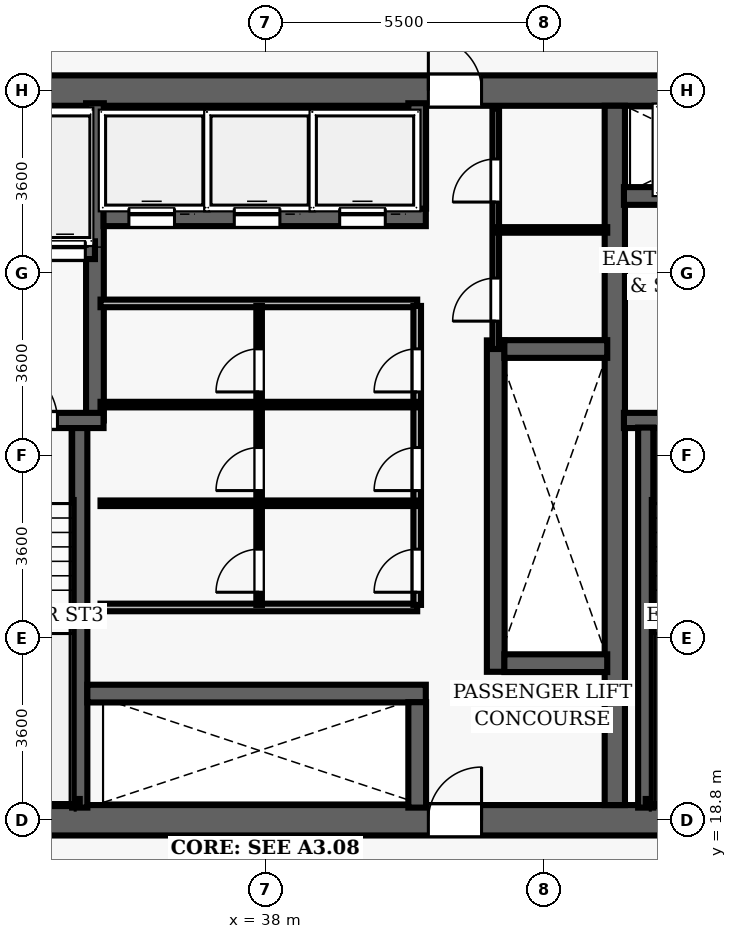
"""IFC4 building model, lengths in metres.
Left out: names, types, materials, properties, quantities, classifications, styles, units other than length and angle.
Written with IfcOpenShell. Run it as: python <this file> out.ifc"""

import sys

from ifc_helpers import new_model, si_unit, direction, frame, frame_2d, origin, place, context, subcontext, project, spatial, rectangle, extrude, element, fill, save


model = new_model("IFC4")
c1 = context("Model", 3, precision=1e-05, world=origin(), true_north=direction((0.0, 1.0)))
c2 = subcontext(c1, "Body", "Model", "MODEL_VIEW")
j1 = project(units=[si_unit("LENGTHUNIT", "METRE"), si_unit("PLANEANGLEUNIT", "RADIAN")], contexts=[c1])
p1 = place(None, origin())
s1 = spatial("IfcSite", under=j1, at=p1, CompositionType="ELEMENT")
p2 = place(p1, origin())
s2 = spatial("IfcBuilding", under=s1, at=p2, CompositionType="ELEMENT")
p3 = place(p2, frame((0.0, 0.0, 48.4)))
s3 = spatial("IfcBuildingStorey", under=s2, at=p3, CompositionType="ELEMENT", Elevation=48.4)
p4 = place(p3, frame((26.7, 18.8, 0.0), z_axis=(0.0, 0.0, 1.0), x_axis=(1.0, 0.0, 0.0)))
e1 = element("IfcWall", 1, at=p4, inside=s3, PredefinedType="SHEAR", context=c2, shape_type="SweptSolid", body=[
    extrude(rectangle(XDim=22.6, YDim=0.6, at=frame_2d((11.3, 0.0))), origin(), (0.0, 0.0, 1.0), 3.5),
])
p5 = place(p4, frame((14.52, 0.0, 0.0)))
e2 = element("IfcOpeningElement", 2, at=p5, cuts=e1, PredefinedType="OPENING", context=c2, shape_type="SweptSolid", body=[
    extrude(rectangle(XDim=1.05, YDim=2.15, at=frame_2d((0.525, 1.075))), frame((0.0, 0.31, 0.0), z_axis=(0.0, -1.0, 0.0), x_axis=(1.0, 0.0, 0.0)), (0.0, 0.0, 1.0), 0.62),
])
p6 = place(p3, frame((26.7, 33.2, 0.0), z_axis=(0.0, 0.0, 1.0), x_axis=(1.0, 0.0, 0.0)))
e3 = element("IfcWall", 3, at=p6, inside=s3, PredefinedType="SHEAR", context=c2, shape_type="SweptSolid", body=[
    extrude(rectangle(XDim=22.6, YDim=0.6, at=frame_2d((11.3, 0.0))), origin(), (0.0, 0.0, 1.0), 3.5),
])
p7 = place(p6, frame((4.62, 0.0, 0.0)))
e4 = element("IfcOpeningElement", 4, at=p7, cuts=e3, PredefinedType="OPENING", context=c2, shape_type="SweptSolid", body=[
    extrude(rectangle(XDim=1.05, YDim=2.15, at=frame_2d((0.525, 1.075))), frame((0.0, 0.31, 0.0), z_axis=(0.0, -1.0, 0.0), x_axis=(1.0, 0.0, 0.0)), (0.0, 0.0, 1.0), 0.62),
])
p8 = place(p6, frame((14.52, 0.0, 0.0)))
e5 = element("IfcOpeningElement", 5, at=p8, cuts=e3, PredefinedType="OPENING", context=c2, shape_type="SweptSolid", body=[
    extrude(rectangle(XDim=1.05, YDim=2.15, at=frame_2d((0.525, 1.075))), frame((0.0, 0.31, 0.0), z_axis=(0.0, -1.0, 0.0), x_axis=(1.0, 0.0, 0.0)), (0.0, 0.0, 1.0), 0.62),
])
p9 = place(p3, frame((44.9, 19.1, 0.0), z_axis=(0.0, 0.0, 1.0), x_axis=(0.0, 1.0, 0.0)))
e6 = element("IfcWall", 6, at=p9, inside=s3, PredefinedType="SHEAR", context=c2, shape_type="SweptSolid", body=[
    extrude(rectangle(XDim=13.8, YDim=0.4, at=frame_2d((6.9, 0.0))), origin(), (0.0, 0.0, 1.0), 3.5),
])
p10 = place(p3, frame((45.08, 26.69, 0.0), z_axis=(0.0, 0.0, 1.0), x_axis=(1.0, 0.0, 0.0)))
e7 = element("IfcWall", 7, at=p10, inside=s3, PredefinedType="SHEAR", context=c2, shape_type="SweptSolid", body=[
    extrude(rectangle(XDim=3.67, YDim=0.3, at=frame_2d((1.835, 0.0))), origin(), (0.0, 0.0, 1.0), 3.5),
])
p11 = place(p10, frame((1.05, 0.0, 0.0)))
e8 = element("IfcOpeningElement", 8, at=p11, cuts=e7, PredefinedType="OPENING", context=c2, shape_type="SweptSolid", body=[
    extrude(rectangle(XDim=1.1, YDim=2.15, at=frame_2d((0.55, 1.075))), frame((0.0, 0.16, 0.0), z_axis=(0.0, -1.0, 0.0), x_axis=(1.0, 0.0, 0.0)), (0.0, 0.0, 1.0), 0.32),
])
p12 = place(p3, frame((45.51, 19.05, 0.0), z_axis=(0.0, 0.0, 1.0), x_axis=(0.0, 1.0, 0.0)))
e9 = element("IfcWall", 9, at=p12, inside=s3, PredefinedType="SHEAR", context=c2, shape_type="SweptSolid", body=[
    extrude(rectangle(XDim=7.5, YDim=0.3, at=frame_2d((3.75, 0.0))), origin(), (0.0, 0.0, 1.0), 3.5),
])
p13 = place(p3, frame((45.51, 19.16, 0.0), z_axis=(0.0, 0.0, 1.0), x_axis=(1.0, 0.0, 0.0)))
e10 = element("IfcWall", 10, at=p13, inside=s3, PredefinedType="SHEAR", context=c2, shape_type="SweptSolid", body=[
    extrude(rectangle(XDim=3.095, YDim=0.12, at=frame_2d((1.547, 0.0))), origin(), (0.0, 0.0, 1.0), 3.5),
])
p14 = place(p3, frame((45.08, 31.12, 0.0), z_axis=(0.0, 0.0, 1.0), x_axis=(1.0, 0.0, 0.0)))
e11 = element("IfcWall", 11, at=p14, inside=s3, PredefinedType="SHEAR", context=c2, shape_type="SweptSolid", body=[
    extrude(rectangle(XDim=3.67, YDim=0.35, at=frame_2d((1.835, 0.0))), origin(), (0.0, 0.0, 1.0), 2.6),
])
p15 = place(p14, frame((1.25, 0.0, 0.0)))
e12 = element("IfcOpeningElement", 12, at=p15, cuts=e11, PredefinedType="OPENING", context=c2, shape_type="SweptSolid", body=[
    extrude(rectangle(XDim=1.1, YDim=2.15, at=frame_2d((0.55, 1.075))), frame((0.0, 0.185, 0.0), z_axis=(0.0, -1.0, 0.0), x_axis=(1.0, 0.0, 0.0)), (0.0, 0.0, 1.0), 0.37),
])
p16 = place(p3, frame((34.34, 19.05, 0.0), z_axis=(0.0, 0.0, 1.0), x_axis=(0.0, 1.0, 0.0)))
e13 = element("IfcWall", 13, at=p16, inside=s3, PredefinedType="SHEAR", context=c2, shape_type="SweptSolid", body=[
    extrude(rectangle(XDim=7.5, YDim=0.3, at=frame_2d((3.75, 0.0))), origin(), (0.0, 0.0, 1.0), 3.5),
])
p17 = place(p3, frame((34.64, 26.69, 0.0), z_axis=(0.0, 0.0, 1.0), x_axis=(0.0, 1.0, 0.0)))
e14 = element("IfcWall", 14, at=p17, inside=s3, PredefinedType="SHEAR", context=c2, shape_type="SweptSolid", body=[
    extrude(rectangle(XDim=6.26, YDim=0.35, at=frame_2d((3.13, 0.0))), origin(), (0.0, 0.0, 1.0), 3.5),
])
p18 = place(p3, frame((31.25, 26.69, 0.0), z_axis=(0.0, 0.0, 1.0), x_axis=(1.0, 0.0, 0.0)))
e15 = element("IfcWall", 15, at=p18, inside=s3, PredefinedType="SHEAR", context=c2, shape_type="SweptSolid", body=[
    extrude(rectangle(XDim=3.56, YDim=0.3, at=frame_2d((1.78, 0.0))), origin(), (0.0, 0.0, 1.0), 3.5),
])
p19 = place(p18, frame((1.55, 0.0, 0.0)))
e16 = element("IfcOpeningElement", 16, at=p19, cuts=e15, PredefinedType="OPENING", context=c2, shape_type="SweptSolid", body=[
    extrude(rectangle(XDim=1.1, YDim=2.15, at=frame_2d((0.55, 1.075))), frame((0.0, 0.16, 0.0), z_axis=(0.0, -1.0, 0.0), x_axis=(1.0, 0.0, 0.0)), (0.0, 0.0, 1.0), 0.32),
])
p20 = place(p3, frame((31.3, 19.16, 0.0), z_axis=(0.0, 0.0, 1.0), x_axis=(1.0, 0.0, 0.0)))
e17 = element("IfcWall", 17, at=p20, inside=s3, PredefinedType="SHEAR", context=c2, shape_type="SweptSolid", body=[
    extrude(rectangle(XDim=3.04, YDim=0.12, at=frame_2d((1.52, 0.0))), origin(), (0.0, 0.0, 1.0), 3.5),
])
p21 = place(p3, frame((32.23, 30.05, 0.0), z_axis=(0.0, 0.0, 1.0), x_axis=(1.0, 0.0, 0.0)))
e18 = element("IfcWall", 18, at=p21, inside=s3, PredefinedType="SHEAR", context=c2, shape_type="SweptSolid", body=[
    extrude(rectangle(XDim=2.41, YDim=0.35, at=frame_2d((1.205, 0.0))), origin(), (0.0, 0.0, 1.0), 2.6),
])
p22 = place(p21, frame((0.42, 0.0, 0.0)))
e19 = element("IfcOpeningElement", 19, at=p22, cuts=e18, PredefinedType="OPENING", context=c2, shape_type="SweptSolid", body=[
    extrude(rectangle(XDim=0.8, YDim=2.15, at=frame_2d((0.4, 1.075))), frame((0.0, 0.185, 0.0), z_axis=(0.0, -1.0, 0.0), x_axis=(1.0, 0.0, 0.0)), (0.0, 0.0, 1.0), 0.37),
])
p23 = place(p21, frame((1.42, 0.0, 0.0)))
e20 = element("IfcOpeningElement", 20, at=p23, cuts=e18, PredefinedType="OPENING", context=c2, shape_type="SweptSolid", body=[
    extrude(rectangle(XDim=0.8, YDim=2.15, at=frame_2d((0.4, 1.075))), frame((0.0, 0.185, 0.0), z_axis=(0.0, -1.0, 0.0), x_axis=(1.0, 0.0, 0.0)), (0.0, 0.0, 1.0), 0.37),
])
p24 = place(p3, frame((42.55, 21.73, 0.0), z_axis=(0.0, 0.0, 1.0), x_axis=(0.0, 1.0, 0.0)))
e21 = element("IfcWall", 21, at=p24, inside=s3, PredefinedType="SHEAR", context=c2, shape_type="SweptSolid", body=[
    extrude(rectangle(XDim=6.54, YDim=0.35, at=frame_2d((3.27, 0.0))), origin(), (0.0, 0.0, 1.0), 2.6),
])
for number, where, z_axis, x_axis in (
    (22, (42.72, 21.9, 0.0), (0.0, 0.0, 1.0), (1.0, 0.0, 0.0)),
    (23, (42.72, 28.1, 0.0), (0.0, 0.0, 1.0), (1.0, 0.0, 0.0)),
):
    element("IfcWall", number, at=place(p3, frame(where, z_axis=z_axis, x_axis=x_axis)), inside=s3, PredefinedType="SHEAR", context=c2, shape_type="SweptSolid", body=[
        extrude(rectangle(XDim=2.03, YDim=0.35, at=frame_2d((1.015, 0.0))), origin(), (0.0, 0.0, 1.0), 2.6),
    ])
p25 = place(p3, frame((34.81, 30.7, 0.0), z_axis=(0.0, 0.0, 1.0), x_axis=(1.0, 0.0, 0.0)))
e24 = element("IfcWall", 24, at=p25, inside=s3, PredefinedType="SHEAR", context=c2, shape_type="SweptSolid", body=[
    extrude(rectangle(XDim=6.36, YDim=0.35, at=frame_2d((3.18, 0.0))), origin(), (0.0, 0.0, 1.0), 2.6),
])
p26 = place(p25, frame((0.5, 0.0, 0.0)))
e25 = element("IfcOpeningElement", 25, at=p26, cuts=e24, PredefinedType="OPENING", context=c2, shape_type="SweptSolid", body=[
    extrude(rectangle(XDim=0.9, YDim=2.15, at=frame_2d((0.45, 1.075))), frame((0.0, 0.185, 0.0), z_axis=(0.0, -1.0, 0.0), x_axis=(1.0, 0.0, 0.0)), (0.0, 0.0, 1.0), 0.37),
])
p27 = place(p25, frame((2.58, 0.0, 0.0)))
e26 = element("IfcOpeningElement", 26, at=p27, cuts=e24, PredefinedType="OPENING", context=c2, shape_type="SweptSolid", body=[
    extrude(rectangle(XDim=0.9, YDim=2.15, at=frame_2d((0.45, 1.075))), frame((0.0, 0.185, 0.0), z_axis=(0.0, -1.0, 0.0), x_axis=(1.0, 0.0, 0.0)), (0.0, 0.0, 1.0), 0.37),
])
p28 = place(p25, frame((4.66, 0.0, 0.0)))
e27 = element("IfcOpeningElement", 27, at=p28, cuts=e24, PredefinedType="OPENING", context=c2, shape_type="SweptSolid", body=[
    extrude(rectangle(XDim=0.9, YDim=2.15, at=frame_2d((0.45, 1.075))), frame((0.0, 0.185, 0.0), z_axis=(0.0, -1.0, 0.0), x_axis=(1.0, 0.0, 0.0)), (0.0, 0.0, 1.0), 0.37),
])
p29 = place(p3, frame((41.0, 30.87, 0.0), z_axis=(0.0, 0.0, 1.0), x_axis=(0.0, 1.0, 0.0)))
e28 = element("IfcWall", 28, at=p29, inside=s3, PredefinedType="SHEAR", context=c2, shape_type="SweptSolid", body=[
    extrude(rectangle(XDim=2.08, YDim=0.35, at=frame_2d((1.04, 0.0))), origin(), (0.0, 0.0, 1.0), 2.6),
])
p30 = place(p3, frame((34.49, 21.3, 0.0), z_axis=(0.0, 0.0, 1.0), x_axis=(1.0, 0.0, 0.0)))
e29 = element("IfcWall", 29, at=p30, inside=s3, PredefinedType="SHEAR", context=c2, shape_type="SweptSolid", body=[
    extrude(rectangle(XDim=6.68, YDim=0.35, at=frame_2d((3.34, 0.0))), origin(), (0.0, 0.0, 1.0), 2.6),
])
p31 = place(p3, frame((41.0, 19.05, 0.0), z_axis=(0.0, 0.0, 1.0), x_axis=(0.0, 1.0, 0.0)))
e30 = element("IfcWall", 30, at=p31, inside=s3, PredefinedType="SHEAR", context=c2, shape_type="SweptSolid", body=[
    extrude(rectangle(XDim=2.08, YDim=0.35, at=frame_2d((1.04, 0.0))), origin(), (0.0, 0.0, 1.0), 2.6),
])
for number, where, z_axis, x_axis in (
    (31, (34.75, 29.0, 0.0), (0.0, 0.0, 1.0), (1.0, 0.0, 0.0)),
    (32, (34.75, 23.0, 0.0), (0.0, 0.0, 1.0), (1.0, 0.0, 0.0)),
):
    element("IfcWall", number, at=place(p3, frame(where, z_axis=z_axis, x_axis=x_axis)), inside=s3, PredefinedType="PARTITIONING", context=c2, shape_type="SweptSolid", body=[
        extrude(rectangle(XDim=6.25, YDim=0.15, at=frame_2d((3.125, 0.0))), origin(), (0.0, 0.0, 1.0), 2.6),
    ])
p32 = place(p3, frame((41.0, 23.05, 0.0), z_axis=(0.0, 0.0, 1.0), x_axis=(0.0, 1.0, 0.0)))
e33 = element("IfcWall", 33, at=p32, inside=s3, PredefinedType="PARTITIONING", context=c2, shape_type="SweptSolid", body=[
    extrude(rectangle(XDim=5.9, YDim=0.15, at=frame_2d((2.95, 0.0))), origin(), (0.0, 0.0, 1.0), 2.6),
])
p33 = place(p32, frame((0.25, 0.0, 0.0)))
e34 = element("IfcOpeningElement", 34, at=p33, cuts=e33, PredefinedType="OPENING", context=c2, shape_type="SweptSolid", body=[
    extrude(rectangle(XDim=0.85, YDim=2.1, at=frame_2d((0.425, 1.05))), frame((0.0, 0.085, 0.0), z_axis=(0.0, -1.0, 0.0), x_axis=(1.0, 0.0, 0.0)), (0.0, 0.0, 1.0), 0.17),
])
p34 = place(p32, frame((2.256, 0.0, 0.0)))
e35 = element("IfcOpeningElement", 35, at=p34, cuts=e33, PredefinedType="OPENING", context=c2, shape_type="SweptSolid", body=[
    extrude(rectangle(XDim=0.85, YDim=2.1, at=frame_2d((0.425, 1.05))), frame((0.0, 0.085, 0.0), z_axis=(0.0, -1.0, 0.0), x_axis=(1.0, 0.0, 0.0)), (0.0, 0.0, 1.0), 0.17),
])
p35 = place(p32, frame((4.203, 0.0, 0.0)))
e36 = element("IfcOpeningElement", 36, at=p35, cuts=e33, PredefinedType="OPENING", context=c2, shape_type="SweptSolid", body=[
    extrude(rectangle(XDim=0.85, YDim=2.1, at=frame_2d((0.425, 1.05))), frame((0.0, 0.085, 0.0), z_axis=(0.0, -1.0, 0.0), x_axis=(1.0, 0.0, 0.0)), (0.0, 0.0, 1.0), 0.17),
])
p36 = place(p3, frame((37.88, 23.05, 0.0), z_axis=(0.0, 0.0, 1.0), x_axis=(0.0, 1.0, 0.0)))
e37 = element("IfcWall", 37, at=p36, inside=s3, PredefinedType="PARTITIONING", context=c2, shape_type="SweptSolid", body=[
    extrude(rectangle(XDim=5.9, YDim=0.11, at=frame_2d((2.95, 0.0))), origin(), (0.0, 0.0, 1.0), 2.6),
])
p37 = place(p36, frame((0.25, 0.0, 0.0)))
e38 = element("IfcOpeningElement", 38, at=p37, cuts=e37, PredefinedType="OPENING", context=c2, shape_type="SweptSolid", body=[
    extrude(rectangle(XDim=0.85, YDim=2.1, at=frame_2d((0.425, 1.05))), frame((0.0, 0.065, 0.0), z_axis=(0.0, -1.0, 0.0), x_axis=(1.0, 0.0, 0.0)), (0.0, 0.0, 1.0), 0.13),
])
p38 = place(p36, frame((2.256, 0.0, 0.0)))
e39 = element("IfcOpeningElement", 39, at=p38, cuts=e37, PredefinedType="OPENING", context=c2, shape_type="SweptSolid", body=[
    extrude(rectangle(XDim=0.85, YDim=2.1, at=frame_2d((0.425, 1.05))), frame((0.0, 0.065, 0.0), z_axis=(0.0, -1.0, 0.0), x_axis=(1.0, 0.0, 0.0)), (0.0, 0.0, 1.0), 0.13),
])
p39 = place(p36, frame((4.203, 0.0, 0.0)))
e40 = element("IfcOpeningElement", 40, at=p39, cuts=e37, PredefinedType="OPENING", context=c2, shape_type="SweptSolid", body=[
    extrude(rectangle(XDim=0.85, YDim=2.1, at=frame_2d((0.425, 1.05))), frame((0.0, 0.065, 0.0), z_axis=(0.0, -1.0, 0.0), x_axis=(1.0, 0.0, 0.0)), (0.0, 0.0, 1.0), 0.13),
])
for number, where, z_axis, x_axis in (
    (41, (34.75, 25.056, 0.0), (0.0, 0.0, 1.0), (1.0, 0.0, 0.0)),
    (42, (34.75, 27.003, 0.0), (0.0, 0.0, 1.0), (1.0, 0.0, 0.0)),
):
    element("IfcWall", number, at=place(p3, frame(where, z_axis=z_axis, x_axis=x_axis)), inside=s3, PredefinedType="PARTITIONING", context=c2, shape_type="SweptSolid", body=[
        extrude(rectangle(XDim=6.25, YDim=0.11, at=frame_2d((3.125, 0.0))), origin(), (0.0, 0.0, 1.0), 2.6),
    ])
p40 = place(p3, frame((42.55, 28.1, 0.0), z_axis=(0.0, 0.0, 1.0), x_axis=(0.0, 1.0, 0.0)))
e43 = element("IfcWall", 43, at=p40, inside=s3, PredefinedType="PARTITIONING", context=c2, shape_type="SweptSolid", body=[
    extrude(rectangle(XDim=4.75, YDim=0.13, at=frame_2d((2.375, 0.0))), origin(), (0.0, 0.0, 1.0), 2.6),
])
p41 = place(p40, frame((0.55, 0.0, 0.0)))
e44 = element("IfcOpeningElement", 44, at=p41, cuts=e43, PredefinedType="OPENING", context=c2, shape_type="SweptSolid", body=[
    extrude(rectangle(XDim=0.85, YDim=2.1, at=frame_2d((0.425, 1.05))), frame((0.0, 0.075, 0.0), z_axis=(0.0, -1.0, 0.0), x_axis=(1.0, 0.0, 0.0)), (0.0, 0.0, 1.0), 0.15),
])
p42 = place(p40, frame((2.9, 0.0, 0.0)))
e45 = element("IfcOpeningElement", 45, at=p42, cuts=e43, PredefinedType="OPENING", context=c2, shape_type="SweptSolid", body=[
    extrude(rectangle(XDim=0.85, YDim=2.1, at=frame_2d((0.425, 1.05))), frame((0.0, 0.075, 0.0), z_axis=(0.0, -1.0, 0.0), x_axis=(1.0, 0.0, 0.0)), (0.0, 0.0, 1.0), 0.15),
])
p43 = place(p3, frame((42.55, 30.45, 0.0), z_axis=(0.0, 0.0, 1.0), x_axis=(1.0, 0.0, 0.0)))
e46 = element("IfcWall", 46, at=p43, inside=s3, PredefinedType="PARTITIONING", context=c2, shape_type="SweptSolid", body=[
    extrude(rectangle(XDim=2.2, YDim=0.11, at=frame_2d((1.1, 0.0))), origin(), (0.0, 0.0, 1.0), 2.6),
])
p44 = place(p19, origin())
e47 = element("IfcDoor", 47, at=p44, inside=s3, OperationType="SINGLE_SWING_LEFT", PredefinedType="DOOR", context=c2, shape_type="SweptSolid", body=[
    extrude(rectangle(XDim=1.1, YDim=2.15, at=frame_2d((0.55, 1.075))), frame((0.0, 0.025, 0.0), z_axis=(0.0, -1.0, 0.0), x_axis=(1.0, 0.0, 0.0)), (0.0, 0.0, 1.0), 0.05),
])
fill(e16, e47)
p45 = place(p8, origin())
e48 = element("IfcDoor", 48, at=p45, inside=s3, OperationType="SINGLE_SWING_LEFT", PredefinedType="DOOR", context=c2, shape_type="SweptSolid", body=[
    extrude(rectangle(XDim=1.05, YDim=2.15, at=frame_2d((0.525, 1.075))), frame((0.0, 0.025, 0.0), z_axis=(0.0, -1.0, 0.0), x_axis=(1.0, 0.0, 0.0)), (0.0, 0.0, 1.0), 0.05),
])
fill(e5, e48)
p46 = place(p5, origin())
e49 = element("IfcDoor", 49, at=p46, inside=s3, OperationType="SINGLE_SWING_RIGHT", PredefinedType="DOOR", context=c2, shape_type="SweptSolid", body=[
    extrude(rectangle(XDim=1.05, YDim=2.15, at=frame_2d((0.525, 1.075))), frame((0.0, 0.025, 0.0), z_axis=(0.0, -1.0, 0.0), x_axis=(1.0, 0.0, 0.0)), (0.0, 0.0, 1.0), 0.05),
])
fill(e2, e49)
p47 = place(p33, origin())
e50 = element("IfcDoor", 50, at=p47, inside=s3, OperationType="SINGLE_SWING_LEFT", PredefinedType="DOOR", context=c2, shape_type="SweptSolid", body=[
    extrude(rectangle(XDim=0.85, YDim=2.1, at=frame_2d((0.425, 1.05))), frame((0.0, 0.025, 0.0), z_axis=(0.0, -1.0, 0.0), x_axis=(1.0, 0.0, 0.0)), (0.0, 0.0, 1.0), 0.05),
])
fill(e34, e50)
p48 = place(p37, origin())
e51 = element("IfcDoor", 51, at=p48, inside=s3, OperationType="SINGLE_SWING_LEFT", PredefinedType="DOOR", context=c2, shape_type="SweptSolid", body=[
    extrude(rectangle(XDim=0.85, YDim=2.1, at=frame_2d((0.425, 1.05))), frame((0.0, 0.025, 0.0), z_axis=(0.0, -1.0, 0.0), x_axis=(1.0, 0.0, 0.0)), (0.0, 0.0, 1.0), 0.05),
])
fill(e38, e51)
p49 = place(p34, origin())
e52 = element("IfcDoor", 52, at=p49, inside=s3, OperationType="SINGLE_SWING_LEFT", PredefinedType="DOOR", context=c2, shape_type="SweptSolid", body=[
    extrude(rectangle(XDim=0.85, YDim=2.1, at=frame_2d((0.425, 1.05))), frame((0.0, 0.025, 0.0), z_axis=(0.0, -1.0, 0.0), x_axis=(1.0, 0.0, 0.0)), (0.0, 0.0, 1.0), 0.05),
])
fill(e35, e52)
p50 = place(p38, origin())
e53 = element("IfcDoor", 53, at=p50, inside=s3, OperationType="SINGLE_SWING_LEFT", PredefinedType="DOOR", context=c2, shape_type="SweptSolid", body=[
    extrude(rectangle(XDim=0.85, YDim=2.1, at=frame_2d((0.425, 1.05))), frame((0.0, 0.025, 0.0), z_axis=(0.0, -1.0, 0.0), x_axis=(1.0, 0.0, 0.0)), (0.0, 0.0, 1.0), 0.05),
])
fill(e39, e53)
p51 = place(p35, origin())
e54 = element("IfcDoor", 54, at=p51, inside=s3, OperationType="SINGLE_SWING_LEFT", PredefinedType="DOOR", context=c2, shape_type="SweptSolid", body=[
    extrude(rectangle(XDim=0.85, YDim=2.1, at=frame_2d((0.425, 1.05))), frame((0.0, 0.025, 0.0), z_axis=(0.0, -1.0, 0.0), x_axis=(1.0, 0.0, 0.0)), (0.0, 0.0, 1.0), 0.05),
])
fill(e36, e54)
p52 = place(p39, origin())
e55 = element("IfcDoor", 55, at=p52, inside=s3, OperationType="SINGLE_SWING_LEFT", PredefinedType="DOOR", context=c2, shape_type="SweptSolid", body=[
    extrude(rectangle(XDim=0.85, YDim=2.1, at=frame_2d((0.425, 1.05))), frame((0.0, 0.025, 0.0), z_axis=(0.0, -1.0, 0.0), x_axis=(1.0, 0.0, 0.0)), (0.0, 0.0, 1.0), 0.05),
])
fill(e40, e55)
p53 = place(p41, origin())
e56 = element("IfcDoor", 56, at=p53, inside=s3, OperationType="SINGLE_SWING_LEFT", PredefinedType="DOOR", context=c2, shape_type="SweptSolid", body=[
    extrude(rectangle(XDim=0.85, YDim=2.1, at=frame_2d((0.425, 1.05))), frame((0.0, 0.025, 0.0), z_axis=(0.0, -1.0, 0.0), x_axis=(1.0, 0.0, 0.0)), (0.0, 0.0, 1.0), 0.05),
])
fill(e44, e56)
p54 = place(p42, origin())
e57 = element("IfcDoor", 57, at=p54, inside=s3, OperationType="SINGLE_SWING_LEFT", PredefinedType="DOOR", context=c2, shape_type="SweptSolid", body=[
    extrude(rectangle(XDim=0.85, YDim=2.1, at=frame_2d((0.425, 1.05))), frame((0.0, 0.025, 0.0), z_axis=(0.0, -1.0, 0.0), x_axis=(1.0, 0.0, 0.0)), (0.0, 0.0, 1.0), 0.05),
])
fill(e45, e57)
p55 = place(p26, origin())
e58 = element("IfcDoor", 58, at=p55, inside=s3, OperationType="SLIDING_TO_LEFT", PredefinedType="DOOR", context=c2, shape_type="SweptSolid", body=[
    extrude(rectangle(XDim=0.9, YDim=2.15, at=frame_2d((0.45, 1.075))), frame((0.0, 0.025, 0.0), z_axis=(0.0, -1.0, 0.0), x_axis=(1.0, 0.0, 0.0)), (0.0, 0.0, 1.0), 0.05),
])
fill(e25, e58)
p56 = place(p27, origin())
e59 = element("IfcDoor", 59, at=p56, inside=s3, OperationType="SLIDING_TO_LEFT", PredefinedType="DOOR", context=c2, shape_type="SweptSolid", body=[
    extrude(rectangle(XDim=0.9, YDim=2.15, at=frame_2d((0.45, 1.075))), frame((0.0, 0.025, 0.0), z_axis=(0.0, -1.0, 0.0), x_axis=(1.0, 0.0, 0.0)), (0.0, 0.0, 1.0), 0.05),
])
fill(e26, e59)
p57 = place(p28, origin())
e60 = element("IfcDoor", 60, at=p57, inside=s3, OperationType="SLIDING_TO_LEFT", PredefinedType="DOOR", context=c2, shape_type="SweptSolid", body=[
    extrude(rectangle(XDim=0.9, YDim=2.15, at=frame_2d((0.45, 1.075))), frame((0.0, 0.025, 0.0), z_axis=(0.0, -1.0, 0.0), x_axis=(1.0, 0.0, 0.0)), (0.0, 0.0, 1.0), 0.05),
])
fill(e27, e60)
p58 = place(p23, origin())
e61 = element("IfcDoor", 61, at=p58, inside=s3, OperationType="SLIDING_TO_LEFT", PredefinedType="DOOR", context=c2, shape_type="SweptSolid", body=[
    extrude(rectangle(XDim=0.8, YDim=2.15, at=frame_2d((0.4, 1.075))), frame((0.0, 0.025, 0.0), z_axis=(0.0, -1.0, 0.0), x_axis=(1.0, 0.0, 0.0)), (0.0, 0.0, 1.0), 0.05),
])
fill(e20, e61)
save(model, sys.argv[1])
